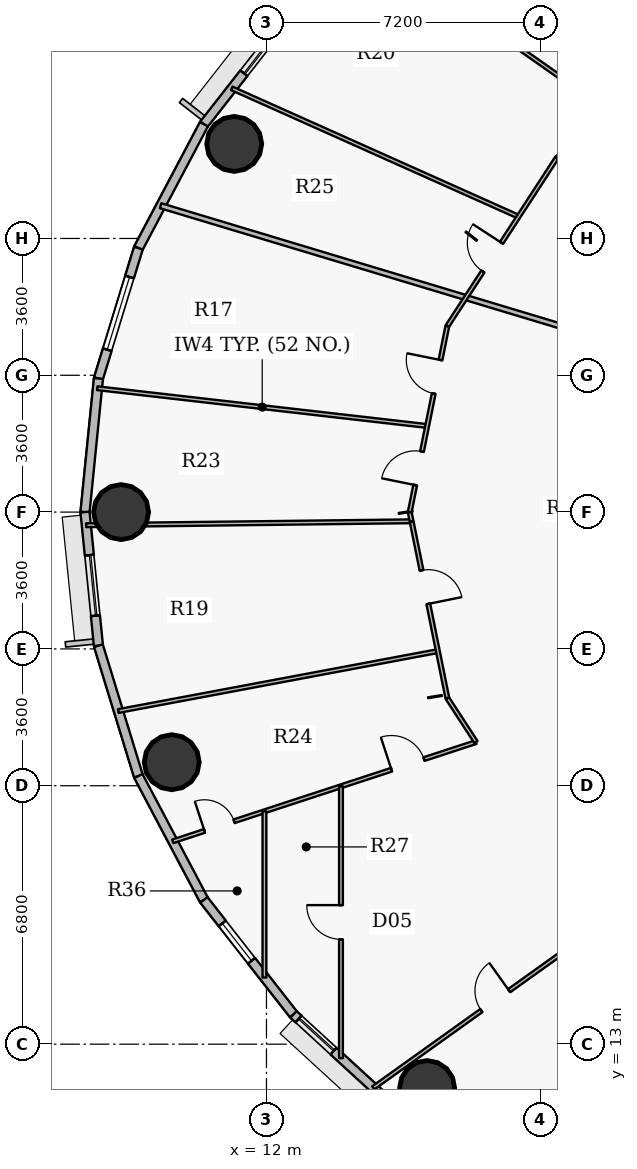
"""IFC4 building model, lengths in metres.
Left out: names, types, materials, properties, quantities, classifications, styles, units other than length and angle.
Written with IfcOpenShell. Run it as: python <this file> out.ifc"""

import sys

from ifc_helpers import new_model, si_unit, direction, frame, frame_2d, origin, origin_2d, place, context, subcontext, project, spatial, rectangle, hollow_circle, extrude, source, transform, mapped, element, fill, save


model = new_model("IFC4")
c1 = context("Model", 3, precision=1e-05, world=origin(), true_north=direction((0.0, 1.0)))
c2 = subcontext(c1, "Body", "Model", "MODEL_VIEW")
j1 = project(units=[si_unit("LENGTHUNIT", "METRE"), si_unit("PLANEANGLEUNIT", "RADIAN")], contexts=[c1])
p1 = place(None, origin())
s1 = spatial("IfcSite", under=j1, at=p1, CompositionType="ELEMENT")
p2 = place(p1, origin())
s2 = spatial("IfcBuilding", under=s1, at=p2, CompositionType="ELEMENT")
p3 = place(p2, frame((0.0, 0.0, 112.2)))
s3 = spatial("IfcBuildingStorey", under=s2, at=p3, CompositionType="ELEMENT", Elevation=112.2)
for number, where, z_axis, x_axis in (
    (1, (11.151, 36.688, 0.0), (0.0, 0.0, 1.0), (1.0, 0.0, 0.0)),
    (2, (8.175, 27.0, 0.0), (0.0, 0.0, 1.0), (1.0, 0.0, 0.0)),
    (3, (9.507, 20.419, 0.0), (0.0, 0.0, 1.0), (1.0, 0.0, 0.0)),
    (4, (16.227, 11.844, 0.0), (0.0, 0.0, 1.0), (1.0, 0.0, 0.0)),
):
    element("IfcColumn", number, at=place(p3, frame(where, z_axis=z_axis, x_axis=x_axis)), inside=s3, PredefinedType="COLUMN", context=c2, shape_type="SweptSolid", body=[
        extrude(hollow_circle(Radius=0.725, WallThickness=0.042, at=origin_2d()), origin(), (0.0, 0.0, 1.0), 3.75),
    ])
p4 = place(p3, frame((10.355, 37.206, 0.0), z_axis=(0.0, 0.0, 1.0), x_axis=(0.616272103517, 0.787533297345, 0.0)))
e5 = element("IfcWall", 5, at=p4, inside=s3, PredefinedType="SOLIDWALL", context=c2, shape_type="SweptSolid", body=[
    extrude(rectangle(XDim=3.823, YDim=0.24, at=frame_2d((1.912, 0.0))), origin(), (0.0, 0.0, 1.0), 3.5),
])
p5 = place(p4, frame((1.705, 0.0, 0.9)))
e6 = element("IfcOpeningElement", 6, at=p5, cuts=e5, PredefinedType="OPENING", context=c2, shape_type="SweptSolid", body=[
    extrude(rectangle(XDim=1.25, YDim=1.65, at=origin_2d()), frame((0.625, 0.13, 0.825), z_axis=(0.0, -1.0, 0.0), x_axis=(1.0, 0.0, 0.0)), (0.0, 0.0, 1.0), 0.26),
])
p6 = place(p3, frame((8.63, 33.945, 0.0), z_axis=(0.0, 0.0, 1.0), x_axis=(0.467614004126, 0.883932770716, 0.0)))
e7 = element("IfcWall", 7, at=p6, inside=s3, PredefinedType="SOLIDWALL", context=c2, shape_type="SweptSolid", body=[
    extrude(rectangle(XDim=3.689, YDim=0.24, at=frame_2d((1.844, 0.0))), origin(), (0.0, 0.0, 1.0), 3.5),
])
p7 = place(p3, frame((7.578, 30.515, 0.0), z_axis=(0.0, 0.0, 1.0), x_axis=(0.293124431344, 0.956074300329, 0.0)))
e8 = element("IfcWall", 8, at=p7, inside=s3, PredefinedType="SOLIDWALL", context=c2, shape_type="SweptSolid", body=[
    extrude(rectangle(XDim=3.587, YDim=0.24, at=frame_2d((1.793, 0.0))), origin(), (0.0, 0.0, 1.0), 3.5),
])
p8 = place(p7, frame((0.794, 0.0, 0.9)))
e9 = element("IfcOpeningElement", 9, at=p8, cuts=e8, PredefinedType="OPENING", context=c2, shape_type="SweptSolid", body=[
    extrude(rectangle(XDim=2.0, YDim=1.75, at=origin_2d()), frame((1.0, 0.13, 0.875), z_axis=(0.0, -1.0, 0.0), x_axis=(1.0, 0.0, 0.0)), (0.0, 0.0, 1.0), 0.26),
])
p9 = place(p3, frame((7.225, 27.0, 0.0), z_axis=(0.0, 0.0, 1.0), x_axis=(0.099989468229, 0.994988495533, 0.0)))
e10 = element("IfcWall", 10, at=p9, inside=s3, PredefinedType="SOLIDWALL", context=c2, shape_type="SweptSolid", body=[
    extrude(rectangle(XDim=3.533, YDim=0.24, at=frame_2d((1.767, 0.0))), origin(), (0.0, 0.0, 1.0), 3.5),
])
p10 = place(p3, frame((7.578, 23.485, 0.0), z_axis=(0.0, 0.0, 1.0), x_axis=(-0.099989468229, 0.994988495533, 0.0)))
e11 = element("IfcWall", 11, at=p10, inside=s3, PredefinedType="SOLIDWALL", context=c2, shape_type="SweptSolid", body=[
    extrude(rectangle(XDim=3.533, YDim=0.24, at=frame_2d((1.767, 0.0))), origin(), (0.0, 0.0, 1.0), 3.5),
])
p11 = place(p10, frame((0.794, 0.0, 0.9)))
e12 = element("IfcOpeningElement", 12, at=p11, cuts=e11, PredefinedType="OPENING", context=c2, shape_type="SweptSolid", body=[
    extrude(rectangle(XDim=1.6, YDim=1.75, at=origin_2d()), frame((0.8, 0.13, 0.875), z_axis=(0.0, -1.0, 0.0), x_axis=(1.0, 0.0, 0.0)), (0.0, 0.0, 1.0), 0.26),
])
p12 = place(p3, frame((8.63, 20.055, 0.0), z_axis=(0.0, 0.0, 1.0), x_axis=(-0.293124431344, 0.956074300329, 0.0)))
e13 = element("IfcWall", 13, at=p12, inside=s3, PredefinedType="SOLIDWALL", context=c2, shape_type="SweptSolid", body=[
    extrude(rectangle(XDim=3.587, YDim=0.24, at=frame_2d((1.793, 0.0))), origin(), (0.0, 0.0, 1.0), 3.5),
])
p13 = place(p3, frame((10.355, 16.794, 0.0), z_axis=(0.0, 0.0, 1.0), x_axis=(-0.467614004126, 0.883932770716, 0.0)))
e14 = element("IfcWall", 14, at=p13, inside=s3, PredefinedType="SOLIDWALL", context=c2, shape_type="SweptSolid", body=[
    extrude(rectangle(XDim=3.689, YDim=0.24, at=frame_2d((1.844, 0.0))), origin(), (0.0, 0.0, 1.0), 3.5),
])
p14 = place(p3, frame((12.711, 13.783, 0.0), z_axis=(0.0, 0.0, 1.0), x_axis=(-0.616272103517, 0.787533297345, 0.0)))
e15 = element("IfcWall", 15, at=p14, inside=s3, PredefinedType="SOLIDWALL", context=c2, shape_type="SweptSolid", body=[
    extrude(rectangle(XDim=3.823, YDim=0.24, at=frame_2d((1.912, 0.0))), origin(), (0.0, 0.0, 1.0), 3.5),
])
p15 = place(p14, frame((1.791, 0.0, 0.9)))
e16 = element("IfcOpeningElement", 16, at=p15, cuts=e15, PredefinedType="OPENING", context=c2, shape_type="SweptSolid", body=[
    extrude(rectangle(XDim=1.25, YDim=1.65, at=origin_2d()), frame((0.625, 0.13, 0.825), z_axis=(0.0, -1.0, 0.0), x_axis=(1.0, 0.0, 0.0)), (0.0, 0.0, 1.0), 0.26),
])
p16 = place(p3, frame((15.642, 11.097, 0.0), z_axis=(0.0, 0.0, 1.0), x_axis=(-0.737113356241, 0.675769117414, 0.0)))
e17 = element("IfcWall", 17, at=p16, inside=s3, PredefinedType="SOLIDWALL", context=c2, shape_type="SweptSolid", body=[
    extrude(rectangle(XDim=3.976, YDim=0.24, at=frame_2d((1.988, 0.0))), origin(), (0.0, 0.0, 1.0), 3.5),
])
p17 = place(p16, frame((2.546, 0.0, 0.9)))
e18 = element("IfcOpeningElement", 18, at=p17, cuts=e17, PredefinedType="OPENING", context=c2, shape_type="SweptSolid", body=[
    extrude(rectangle(XDim=1.25, YDim=1.65, at=origin_2d()), frame((0.625, 0.13, 0.825), z_axis=(0.0, -1.0, 0.0), x_axis=(1.0, 0.0, 0.0)), (0.0, 0.0, 1.0), 0.26),
])
p18 = place(p3, frame((7.255, 26.655, 0.0), z_axis=(0.0, 0.0, 1.0), x_axis=(0.999927994094, 0.012000276098, 0.0)))
e19 = element("IfcWall", 19, at=p18, inside=s3, PredefinedType="PARTITIONING", context=c2, shape_type="SweptSolid", body=[
    extrude(rectangle(XDim=8.565, YDim=0.1, at=frame_2d((4.283, 0.0))), origin(), (0.0, 0.0, 1.0), 2.935),
])
p19 = place(p3, frame((7.548, 30.259, 0.0), z_axis=(0.0, 0.0, 1.0), x_axis=(0.993502465776, -0.11381059044, 0.0)))
e20 = element("IfcWall", 20, at=p19, inside=s3, PredefinedType="PARTITIONING", context=c2, shape_type="SweptSolid", body=[
    extrude(rectangle(XDim=8.737, YDim=0.1, at=frame_2d((4.369, 0.0))), origin(), (0.0, 0.0, 1.0), 2.935),
])
p20 = place(p3, frame((8.1, 21.765, 0.0), z_axis=(0.0, 0.0, 1.0), x_axis=(0.982848598081, 0.184414297849, 0.0)))
e21 = element("IfcWall", 21, at=p20, inside=s3, PredefinedType="PARTITIONING", context=c2, shape_type="SweptSolid", body=[
    extrude(rectangle(XDim=8.556, YDim=0.1, at=frame_2d((4.278, 0.0))), origin(), (0.0, 0.0, 1.0), 2.935),
])
p21 = place(p3, frame((9.215, 35.062, 0.0), z_axis=(0.0, 0.0, 1.0), x_axis=(0.957569176287, -0.288203526393, 0.0)))
e22 = element("IfcWall", 22, at=p21, inside=s3, PredefinedType="PARTITIONING", context=c2, shape_type="SweptSolid", body=[
    extrude(rectangle(XDim=14.552, YDim=0.135, at=frame_2d((7.276, 0.0))), origin(), (0.0, 0.0, 1.0), 2.935),
])
p22 = place(p3, frame((9.533, 18.337, 0.0), z_axis=(0.0, 0.0, 1.0), x_axis=(0.950384937961, 0.311076308478, 0.0)))
e23 = element("IfcWall", 23, at=p22, inside=s3, PredefinedType="PARTITIONING", context=c2, shape_type="SweptSolid", body=[
    extrude(rectangle(XDim=8.396, YDim=0.1, at=frame_2d((4.198, 0.0))), origin(), (0.0, 0.0, 1.0), 2.935),
])
p23 = place(p22, frame((6.057, 0.0, 0.0)))
e24 = element("IfcOpeningElement", 24, at=p23, cuts=e23, PredefinedType="OPENING", context=c2, shape_type="SweptSolid", body=[
    extrude(rectangle(XDim=0.9, YDim=2.1, at=origin_2d()), frame((0.45, 0.06, 1.05), z_axis=(0.0, -1.0, 0.0), x_axis=(1.0, 0.0, 0.0)), (0.0, 0.0, 1.0), 0.12),
])
p24 = place(p22, frame((0.88, 0.0, 0.0)))
e25 = element("IfcOpeningElement", 25, at=p24, cuts=e23, PredefinedType="OPENING", context=c2, shape_type="SweptSolid", body=[
    extrude(rectangle(XDim=0.82, YDim=2.1, at=origin_2d()), frame((0.41, 0.06, 1.05), z_axis=(0.0, -1.0, 0.0), x_axis=(1.0, 0.0, 0.0)), (0.0, 0.0, 1.0), 0.12),
])
p25 = place(p3, frame((11.087, 38.15, 0.0), z_axis=(0.0, 0.0, 1.0), x_axis=(0.912756243594, -0.408504638627, 0.0)))
e26 = element("IfcWall", 26, at=p25, inside=s3, PredefinedType="PARTITIONING", context=c2, shape_type="SweptSolid", body=[
    extrude(rectangle(XDim=8.267, YDim=0.1, at=frame_2d((4.133, 0.0))), origin(), (0.0, 0.0, 1.0), 2.935),
])
p26 = place(p3, frame((11.947, 14.752, 0.0), z_axis=(0.0, 0.0, 1.0), x_axis=(0.0, 1.0, 0.0)))
e27 = element("IfcWall", 27, at=p26, inside=s3, PredefinedType="PARTITIONING", context=c2, shape_type="SweptSolid", body=[
    extrude(rectangle(XDim=4.374, YDim=0.1, at=frame_2d((2.187, 0.0))), origin(), (0.0, 0.0, 1.0), 2.935),
])
p27 = place(p3, frame((13.96, 12.631, 0.0), z_axis=(0.0, 0.0, 1.0), x_axis=(0.0, 1.0, 0.0)))
e28 = element("IfcWall", 28, at=p27, inside=s3, PredefinedType="PARTITIONING", context=c2, shape_type="SweptSolid", body=[
    extrude(rectangle(XDim=7.154, YDim=0.1, at=frame_2d((3.577, 0.0))), origin(), (0.0, 0.0, 1.0), 2.935),
])
p28 = place(p27, frame((3.127, 0.0, 0.0)))
e29 = element("IfcOpeningElement", 29, at=p28, cuts=e28, PredefinedType="OPENING", context=c2, shape_type="SweptSolid", body=[
    extrude(rectangle(XDim=0.9, YDim=2.1, at=origin_2d()), frame((0.45, 0.06, 1.05), z_axis=(0.0, -1.0, 0.0), x_axis=(1.0, 0.0, 0.0)), (0.0, 0.0, 1.0), 0.12),
])
p29 = place(p3, frame((14.661, 42.011, 0.0), z_axis=(0.0, 0.0, 1.0), x_axis=(0.817899711196, -0.575360810645, 0.0)))
e30 = element("IfcWall", 30, at=p29, inside=s3, PredefinedType="PARTITIONING", context=c2, shape_type="SweptSolid", body=[
    extrude(rectangle(XDim=7.891, YDim=0.1, at=frame_2d((3.945, 0.0))), origin(), (0.0, 0.0, 1.0), 2.935),
])
p30 = place(p29, frame((3.495, 0.0, 0.0)))
e31 = element("IfcOpeningElement", 31, at=p30, cuts=e30, PredefinedType="OPENING", context=c2, shape_type="SweptSolid", body=[
    extrude(rectangle(XDim=0.9, YDim=2.1, at=origin_2d()), frame((0.45, 0.06, 1.05), z_axis=(0.0, -1.0, 0.0), x_axis=(1.0, 0.0, 0.0)), (0.0, 0.0, 1.0), 0.12),
])
p31 = place(p3, frame((14.811, 11.851, 0.0), z_axis=(0.0, 0.0, 1.0), x_axis=(0.813476205606, 0.581598197137, 0.0)))
e32 = element("IfcWall", 32, at=p31, inside=s3, PredefinedType="PARTITIONING", context=c2, shape_type="SweptSolid", body=[
    extrude(rectangle(XDim=7.889, YDim=0.1, at=frame_2d((3.945, 0.0))), origin(), (0.0, 0.0, 1.0), 2.935),
])
p32 = place(p31, frame((3.495, 0.0, 0.0)))
e33 = element("IfcOpeningElement", 33, at=p32, cuts=e32, PredefinedType="OPENING", context=c2, shape_type="SweptSolid", body=[
    extrude(rectangle(XDim=0.9, YDim=2.1, at=origin_2d()), frame((0.45, 0.06, 1.05), z_axis=(0.0, -1.0, 0.0), x_axis=(1.0, 0.0, 0.0)), (0.0, 0.0, 1.0), 0.12),
])
p33 = place(p3, frame((15.77, 27.0, 0.0), z_axis=(0.0, 0.0, 1.0), x_axis=(0.198585481658, -0.980083571169, 0.0)))
e34 = element("IfcWall", 34, at=p33, inside=s3, PredefinedType="PARTITIONING", context=c2, shape_type="SweptSolid", body=[
    extrude(rectangle(XDim=0.247, YDim=0.1, at=frame_2d((0.124, 0.0))), origin(), (0.0, 0.0, 1.0), 2.935),
])
p34 = place(p3, frame((15.77, 27.0, 0.0), z_axis=(0.0, 0.0, 1.0), x_axis=(0.19822142127, 0.980157267049, 0.0)))
e35 = element("IfcWall", 35, at=p34, inside=s3, PredefinedType="PARTITIONING", context=c2, shape_type="SweptSolid", body=[
    extrude(rectangle(XDim=4.994, YDim=0.1, at=frame_2d((2.497, 0.0))), origin(), (0.0, 0.0, 1.0), 2.935),
])
p35 = place(p34, frame((3.183, 0.0, 0.0)))
e36 = element("IfcOpeningElement", 36, at=p35, cuts=e35, PredefinedType="OPENING", context=c2, shape_type="SweptSolid", body=[
    extrude(rectangle(XDim=0.9, YDim=2.1, at=origin_2d()), frame((0.45, 0.06, 1.05), z_axis=(0.0, -1.0, 0.0), x_axis=(1.0, 0.0, 0.0)), (0.0, 0.0, 1.0), 0.12),
])
p36 = place(p34, frame((0.725, 0.0, 0.0)))
e37 = element("IfcOpeningElement", 37, at=p36, cuts=e35, PredefinedType="OPENING", context=c2, shape_type="SweptSolid", body=[
    extrude(rectangle(XDim=0.9, YDim=2.1, at=origin_2d()), frame((0.45, 0.06, 1.05), z_axis=(0.0, -1.0, 0.0), x_axis=(1.0, 0.0, 0.0)), (0.0, 0.0, 1.0), 0.12),
])
p37 = place(p3, frame((15.821, 26.748, 0.0), z_axis=(0.0, 0.0, 1.0), x_axis=(0.198216867743, -0.980158187918, 0.0)))
e38 = element("IfcWall", 38, at=p37, inside=s3, PredefinedType="PARTITIONING", context=c2, shape_type="SweptSolid", body=[
    extrude(rectangle(XDim=4.737, YDim=0.1, at=frame_2d((2.369, 0.0))), origin(), (0.0, 0.0, 1.0), 2.935),
])
p38 = place(p37, frame((1.307, 0.0, 0.0)))
e39 = element("IfcOpeningElement", 39, at=p38, cuts=e38, PredefinedType="OPENING", context=c2, shape_type="SweptSolid", body=[
    extrude(rectangle(XDim=0.9, YDim=2.1, at=origin_2d()), frame((0.45, 0.06, 1.05), z_axis=(0.0, -1.0, 0.0), x_axis=(1.0, 0.0, 0.0)), (0.0, 0.0, 1.0), 0.12),
])
p39 = place(p3, frame((16.76, 22.105, 0.0), z_axis=(0.0, 0.0, 1.0), x_axis=(0.54547956044, -0.83812412514, 0.0)))
e40 = element("IfcWall", 40, at=p39, inside=s3, PredefinedType="PARTITIONING", context=c2, shape_type="SweptSolid", body=[
    extrude(rectangle(XDim=1.38, YDim=0.1, at=frame_2d((0.69, 0.0))), origin(), (0.0, 0.0, 1.0), 2.935),
])
p40 = place(p3, frame((16.76, 31.895, 0.0), z_axis=(0.0, 0.0, 1.0), x_axis=(0.545405249109, 0.838172484781, 0.0)))
e41 = element("IfcWall", 41, at=p40, inside=s3, PredefinedType="PARTITIONING", context=c2, shape_type="SweptSolid", body=[
    extrude(rectangle(XDim=5.269, YDim=0.1, at=frame_2d((2.634, 0.0))), origin(), (0.0, 0.0, 1.0), 2.935),
])
p41 = place(p40, frame((1.713, 0.0, 0.0)))
e42 = element("IfcOpeningElement", 42, at=p41, cuts=e41, PredefinedType="OPENING", context=c2, shape_type="SweptSolid", body=[
    extrude(rectangle(XDim=0.9, YDim=2.1, at=origin_2d()), frame((0.45, 0.06, 1.05), z_axis=(0.0, -1.0, 0.0), x_axis=(1.0, 0.0, 0.0)), (0.0, 0.0, 1.0), 0.12),
])
p42 = place(p3, frame((19.634, 36.311, 0.0), z_axis=(0.0, 0.0, 1.0), x_axis=(0.787307829703, 0.616560119768, 0.0)))
e43 = element("IfcWall", 43, at=p42, inside=s3, PredefinedType="PARTITIONING", context=c2, shape_type="SweptSolid", body=[
    extrude(rectangle(XDim=1.882, YDim=0.1, at=frame_2d((0.941, 0.0))), origin(), (0.0, 0.0, 1.0), 3.5),
])
m1 = source(origin(), c2, "Body", "SweptSolid", [
    extrude(rectangle(XDim=1.25, YDim=1.65, at=origin_2d()), frame((0.625, 0.03, 0.825), z_axis=(0.0, -1.0, 0.0), x_axis=(1.0, 0.0, 0.0)), (0.0, 0.0, 1.0), 0.06),
])
p43 = place(p5, origin())
e44 = element("IfcWindow", 44, at=p43, inside=s3, PartitioningType="SINGLE_PANEL", PredefinedType="WINDOW", context=c2, shape_type="MappedRepresentation", body=[
    mapped(m1, transform((0.0, 0.0, 0.0), x_axis=(1.0, 0.0, 0.0), y_axis=(0.0, 1.0, 0.0), z_axis=(0.0, 0.0, 1.0), scale=1.0)),
])
fill(e6, e44)
m2 = source(origin(), c2, "Body", "SweptSolid", [
    extrude(rectangle(XDim=2.0, YDim=1.75, at=origin_2d()), frame((1.0, 0.03, 0.875), z_axis=(0.0, -1.0, 0.0), x_axis=(1.0, 0.0, 0.0)), (0.0, 0.0, 1.0), 0.06),
])
p44 = place(p8, origin())
e45 = element("IfcWindow", 45, at=p44, inside=s3, PartitioningType="DOUBLE_PANEL_VERTICAL", PredefinedType="WINDOW", context=c2, shape_type="MappedRepresentation", body=[
    mapped(m2, transform((0.0, 0.0, 0.0), x_axis=(1.0, 0.0, 0.0), y_axis=(0.0, 1.0, 0.0), z_axis=(0.0, 0.0, 1.0), scale=1.0)),
])
fill(e9, e45)
m3 = source(origin(), c2, "Body", "SweptSolid", [
    extrude(rectangle(XDim=1.6, YDim=1.75, at=origin_2d()), frame((0.8, 0.03, 0.875), z_axis=(0.0, -1.0, 0.0), x_axis=(1.0, 0.0, 0.0)), (0.0, 0.0, 1.0), 0.06),
])
p45 = place(p11, origin())
e46 = element("IfcWindow", 46, at=p45, inside=s3, PartitioningType="DOUBLE_PANEL_VERTICAL", PredefinedType="WINDOW", context=c2, shape_type="MappedRepresentation", body=[
    mapped(m3, transform((0.0, 0.0, 0.0), x_axis=(1.0, 0.0, 0.0), y_axis=(0.0, 1.0, 0.0), z_axis=(0.0, 0.0, 1.0), scale=1.0)),
])
fill(e12, e46)
p46 = place(p15, origin())
e47 = element("IfcWindow", 47, at=p46, inside=s3, PartitioningType="SINGLE_PANEL", PredefinedType="WINDOW", context=c2, shape_type="MappedRepresentation", body=[
    mapped(m1, transform((0.0, 0.0, 0.0), x_axis=(1.0, 0.0, 0.0), y_axis=(0.0, 1.0, 0.0), z_axis=(0.0, 0.0, 1.0), scale=1.0)),
])
fill(e16, e47)
p47 = place(p17, origin())
e48 = element("IfcWindow", 48, at=p47, inside=s3, PartitioningType="SINGLE_PANEL", PredefinedType="WINDOW", context=c2, shape_type="MappedRepresentation", body=[
    mapped(m1, transform((0.0, 0.0, 0.0), x_axis=(1.0, 0.0, 0.0), y_axis=(0.0, 1.0, 0.0), z_axis=(0.0, 0.0, 1.0), scale=1.0)),
])
fill(e18, e48)
m4 = source(origin(), c2, "Body", "SweptSolid", [
    extrude(rectangle(XDim=0.9, YDim=2.1, at=origin_2d()), frame((0.45, 0.025, 1.05), z_axis=(0.0, -1.0, 0.0), x_axis=(1.0, 0.0, 0.0)), (0.0, 0.0, 1.0), 0.05),
])
p48 = place(p41, origin())
e49 = element("IfcDoor", 49, at=p48, inside=s3, OperationType="SINGLE_SWING_RIGHT", PredefinedType="DOOR", context=c2, shape_type="MappedRepresentation", body=[
    mapped(m4, transform((0.0, 0.0, 0.0), x_axis=(1.0, 0.0, 0.0), y_axis=(0.0, 1.0, 0.0), z_axis=(0.0, 0.0, 1.0), scale=1.0)),
])
fill(e42, e49)
p49 = place(p35, origin())
e50 = element("IfcDoor", 50, at=p49, inside=s3, OperationType="SINGLE_SWING_RIGHT", PredefinedType="DOOR", context=c2, shape_type="MappedRepresentation", body=[
    mapped(m4, transform((0.0, 0.0, 0.0), x_axis=(1.0, 0.0, 0.0), y_axis=(0.0, 1.0, 0.0), z_axis=(0.0, 0.0, 1.0), scale=1.0)),
])
fill(e36, e50)
p50 = place(p36, origin())
e51 = element("IfcDoor", 51, at=p50, inside=s3, OperationType="SINGLE_SWING_LEFT", PredefinedType="DOOR", context=c2, shape_type="MappedRepresentation", body=[
    mapped(m4, transform((0.0, 0.0, 0.0), x_axis=(1.0, 0.0, 0.0), y_axis=(0.0, 1.0, 0.0), z_axis=(0.0, 0.0, 1.0), scale=1.0)),
])
fill(e37, e51)
p51 = place(p38, origin())
e52 = element("IfcDoor", 52, at=p51, inside=s3, OperationType="SINGLE_SWING_RIGHT", PredefinedType="DOOR", context=c2, shape_type="MappedRepresentation", body=[
    mapped(m4, transform((0.0, 0.0, 0.0), x_axis=(1.0, 0.0, 0.0), y_axis=(0.0, 1.0, 0.0), z_axis=(0.0, 0.0, 1.0), scale=1.0)),
])
fill(e39, e52)
p52 = place(p23, origin())
e53 = element("IfcDoor", 53, at=p52, inside=s3, OperationType="SINGLE_SWING_LEFT", PredefinedType="DOOR", context=c2, shape_type="MappedRepresentation", body=[
    mapped(m4, transform((0.0, 0.0, 0.0), x_axis=(1.0, 0.0, 0.0), y_axis=(0.0, 1.0, 0.0), z_axis=(0.0, 0.0, 1.0), scale=1.0)),
])
fill(e24, e53)
p53 = place(p32, origin())
e54 = element("IfcDoor", 54, at=p53, inside=s3, OperationType="SINGLE_SWING_RIGHT", PredefinedType="DOOR", context=c2, shape_type="MappedRepresentation", body=[
    mapped(m4, transform((0.0, 0.0, 0.0), x_axis=(1.0, 0.0, 0.0), y_axis=(0.0, 1.0, 0.0), z_axis=(0.0, 0.0, 1.0), scale=1.0)),
])
fill(e33, e54)
m5 = source(origin(), c2, "Body", "SweptSolid", [
    extrude(rectangle(XDim=0.82, YDim=2.1, at=origin_2d()), frame((0.41, 0.025, 1.05), z_axis=(0.0, -1.0, 0.0), x_axis=(1.0, 0.0, 0.0)), (0.0, 0.0, 1.0), 0.05),
])
p54 = place(p24, origin())
e55 = element("IfcDoor", 55, at=p54, inside=s3, OperationType="SINGLE_SWING_LEFT", PredefinedType="DOOR", context=c2, shape_type="MappedRepresentation", body=[
    mapped(m5, transform((0.0, 0.0, 0.0), x_axis=(1.0, 0.0, 0.0), y_axis=(0.0, 1.0, 0.0), z_axis=(0.0, 0.0, 1.0), scale=1.0)),
])
fill(e25, e55)
p55 = place(p28, origin())
e56 = element("IfcDoor", 56, at=p55, inside=s3, OperationType="SINGLE_SWING_RIGHT", PredefinedType="DOOR", context=c2, shape_type="MappedRepresentation", body=[
    mapped(m4, transform((0.0, 0.0, 0.0), x_axis=(1.0, 0.0, 0.0), y_axis=(0.0, 1.0, 0.0), z_axis=(0.0, 0.0, 1.0), scale=1.0)),
])
fill(e29, e56)
save(model, sys.argv[1])
